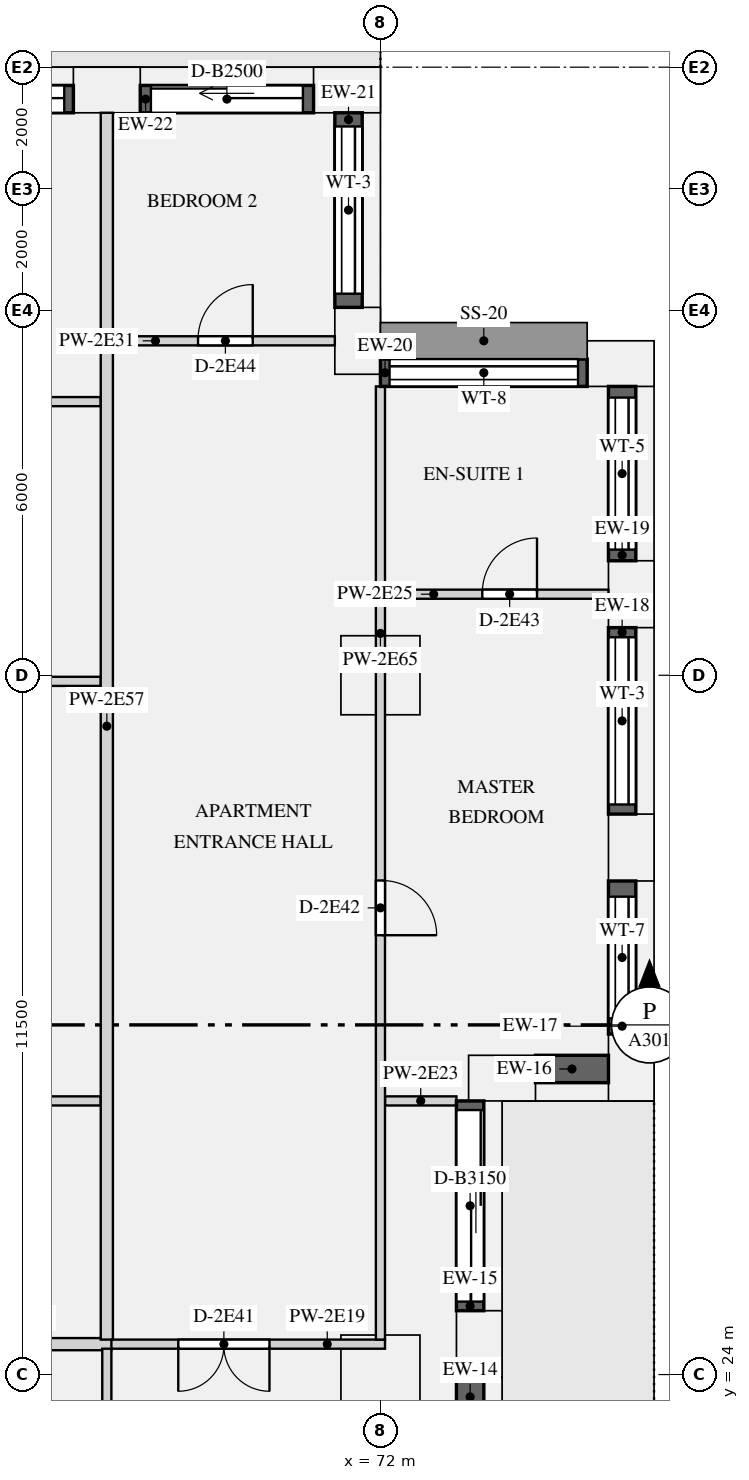
"""IFC4 building model, lengths in metres.
Left out: names, types, materials, properties, quantities, classifications, styles, units other than length and angle.
Written with IfcOpenShell. Run it as: python <this file> out.ifc"""

import sys

from ifc_helpers import new_model, si_unit, direction, frame, frame_2d, origin, origin_2d, place, context, subcontext, project, spatial, rectangle, extrude, element, fill, save


model = new_model("IFC4")
c1 = context("Model", 3, precision=1e-05, world=origin(), true_north=direction((0.0, 1.0)))
c2 = subcontext(c1, "Body", "Model", "MODEL_VIEW")
j1 = project(units=[si_unit("LENGTHUNIT", "METRE"), si_unit("PLANEANGLEUNIT", "RADIAN")], contexts=[c1])
p1 = place(None, origin())
s1 = spatial("IfcSite", under=j1, at=p1, CompositionType="ELEMENT")
p2 = place(p1, origin())
s2 = spatial("IfcBuilding", under=s1, at=p2, CompositionType="ELEMENT")
p3 = place(p2, frame((0.0, 0.0, 118.2)))
s3 = spatial("IfcBuildingStorey", under=s2, at=p3, CompositionType="ELEMENT", Elevation=118.2)
for number, where, z_axis, x_axis in (
    (1, (73.625, 24.5, 0.0), (0.0, 0.0, 1.0), (0.0, 1.0, 0.0)),
    (2, (74.0, 28.875, 0.0), (0.0, 0.0, 1.0), (1.0, 0.0, 0.0)),
    (3, (76.125, 29.05, 0.0), (0.0, 0.0, 1.0), (0.0, 1.0, 0.0)),
    (4, (76.125, 32.667, 0.0), (0.0, 0.0, 1.0), (0.0, 1.0, 0.0)),
    (5, (76.125, 36.833, 0.0), (0.0, 0.0, 1.0), (0.0, 1.0, 0.0)),
    (6, (75.95, 40.625, 0.0), (0.0, 0.0, 1.0), (-1.0, 0.0, 0.0)),
    (7, (71.625, 41.0, 0.0), (0.0, 0.0, 1.0), (0.0, 1.0, 0.0)),
    (8, (71.45, 45.125, 0.0), (0.0, 0.0, 1.0), (-1.0, 0.0, 0.0)),
    (9, (67.5, 45.125, 0.0), (0.0, 0.0, 1.0), (-1.0, 0.0, 0.0)),
):
    element("IfcColumn", number, at=place(p3, frame(where, z_axis=z_axis, x_axis=x_axis)), inside=s3, PredefinedType="USERDEFINED", context=c2, shape_type="SweptSolid", body=[
        extrude(rectangle(XDim=1.1, YDim=0.75, at=origin_2d()), origin(), (0.0, 0.0, 1.0), 3.15),
    ])
for number, where, z_axis, x_axis in (
    (10, (72.0, 24.0, 0.0), (0.0, 0.0, 1.0), (1.0, 0.0, 0.0)),
    (11, (72.0, 35.5, 0.0), (0.0, 0.0, 1.0), (1.0, 0.0, 0.0)),
):
    element("IfcColumn", number, at=place(p3, frame(where, z_axis=z_axis, x_axis=x_axis)), inside=s3, PredefinedType="COLUMN", context=c2, shape_type="SweptSolid", body=[
        extrude(rectangle(XDim=1.3, YDim=1.3, at=origin_2d()), origin(), (0.0, 0.0, 1.0), 3.15),
    ])
p4 = place(p3, frame((73.475, 21.05, 0.0), z_axis=(0.0, 0.0, 1.0), x_axis=(0.0, 1.0, 0.0)))
e12 = element("IfcWall", 12, at=p4, inside=s3, PredefinedType="SOLIDWALL", context=c2, shape_type="SweptSolid", body=[
    extrude(rectangle(XDim=2.9, YDim=0.45, at=frame_2d((1.45, 0.0))), origin(), (0.0, 0.0, 1.0), 2.83),
])
p5 = place(p4, frame((0.165, 0.0, 0.0)))
e13 = element("IfcOpeningElement", 13, at=p5, cuts=e12, PredefinedType="OPENING", context=c2, shape_type="SweptSolid", body=[
    extrude(rectangle(XDim=2.1, YDim=2.3, at=frame_2d((1.05, 1.15))), frame((0.0, 0.235, 0.0), z_axis=(0.0, -1.0, 0.0), x_axis=(1.0, 0.0, 0.0)), (0.0, 0.0, 1.0), 0.47),
])
p6 = place(p3, frame((73.475, 25.05, 0.0), z_axis=(0.0, 0.0, 1.0), x_axis=(0.0, 1.0, 0.0)))
e14 = element("IfcWall", 14, at=p6, inside=s3, PredefinedType="SOLIDWALL", context=c2, shape_type="SweptSolid", body=[
    extrude(rectangle(XDim=3.45, YDim=0.45, at=frame_2d((1.725, 0.0))), origin(), (0.0, 0.0, 1.0), 2.83),
])
p7 = place(p6, frame((0.15, 0.0, 0.0)))
e15 = element("IfcOpeningElement", 15, at=p7, cuts=e14, PredefinedType="OPENING", context=c2, shape_type="SweptSolid", body=[
    extrude(rectangle(XDim=3.15, YDim=2.3, at=frame_2d((1.575, 1.15))), frame((0.0, 0.235, 0.0), z_axis=(0.0, -1.0, 0.0), x_axis=(1.0, 0.0, 0.0)), (0.0, 0.0, 1.0), 0.47),
])
p8 = place(p3, frame((74.55, 29.025, 0.9), z_axis=(0.0, 0.0, 1.0), x_axis=(1.0, 0.0, 0.0)))
e16 = element("IfcWall", 16, at=p8, inside=s3, PredefinedType="SOLIDWALL", context=c2, shape_type="SweptSolid", body=[
    extrude(rectangle(XDim=1.2, YDim=0.45, at=frame_2d((0.6, 0.0))), origin(), (0.0, 0.0, 1.0), 1.93),
])
p9 = place(p3, frame((75.975, 29.6, 0.9), z_axis=(0.0, 0.0, 1.0), x_axis=(0.0, 1.0, 0.0)))
e17 = element("IfcWall", 17, at=p9, inside=s3, PredefinedType="SOLIDWALL", context=c2, shape_type="SweptSolid", body=[
    extrude(rectangle(XDim=2.517, YDim=0.45, at=frame_2d((1.258, 0.0))), origin(), (0.0, 0.0, 1.0), 1.93),
])
p10 = place(p9, frame((0.259, 0.0, 0.15)))
e18 = element("IfcOpeningElement", 18, at=p10, cuts=e17, PredefinedType="OPENING", context=c2, shape_type="SweptSolid", body=[
    extrude(rectangle(XDim=2.0, YDim=1.5, at=frame_2d((1.0, 0.75))), frame((0.0, 0.235, 0.0), z_axis=(0.0, -1.0, 0.0), x_axis=(1.0, 0.0, 0.0)), (0.0, 0.0, 1.0), 0.47),
])
p11 = place(p3, frame((75.975, 33.217, 0.9), z_axis=(0.0, 0.0, 1.0), x_axis=(0.0, 1.0, 0.0)))
e19 = element("IfcWall", 19, at=p11, inside=s3, PredefinedType="SOLIDWALL", context=c2, shape_type="SweptSolid", body=[
    extrude(rectangle(XDim=3.066, YDim=0.45, at=frame_2d((1.533, 0.0))), origin(), (0.0, 0.0, 1.0), 1.93),
])
p12 = place(p11, frame((0.158, 0.0, 0.15)))
e20 = element("IfcOpeningElement", 20, at=p12, cuts=e19, PredefinedType="OPENING", context=c2, shape_type="SweptSolid", body=[
    extrude(rectangle(XDim=2.75, YDim=1.5, at=frame_2d((1.375, 0.75))), frame((0.0, 0.235, 0.0), z_axis=(0.0, -1.0, 0.0), x_axis=(1.0, 0.0, 0.0)), (0.0, 0.0, 1.0), 0.47),
])
p13 = place(p3, frame((75.975, 37.383, 0.9), z_axis=(0.0, 0.0, 1.0), x_axis=(0.0, 1.0, 0.0)))
e21 = element("IfcWall", 21, at=p13, inside=s3, PredefinedType="SOLIDWALL", context=c2, shape_type="SweptSolid", body=[
    extrude(rectangle(XDim=2.867, YDim=0.45, at=frame_2d((1.434, 0.0))), origin(), (0.0, 0.0, 1.0), 1.93),
])
p14 = place(p13, frame((0.184, 0.0, 0.15)))
e22 = element("IfcOpeningElement", 22, at=p14, cuts=e21, PredefinedType="OPENING", context=c2, shape_type="SweptSolid", body=[
    extrude(rectangle(XDim=2.5, YDim=1.5, at=frame_2d((1.25, 0.75))), frame((0.0, 0.235, 0.0), z_axis=(0.0, -1.0, 0.0), x_axis=(1.0, 0.0, 0.0)), (0.0, 0.0, 1.0), 0.47),
])
p15 = place(p3, frame((75.4, 40.475, 0.9), z_axis=(0.0, 0.0, 1.0), x_axis=(-1.0, 0.0, 0.0)))
e23 = element("IfcWall", 23, at=p15, inside=s3, PredefinedType="SOLIDWALL", context=c2, shape_type="SweptSolid", body=[
    extrude(rectangle(XDim=3.4, YDim=0.45, at=frame_2d((1.7, 0.0))), origin(), (0.0, 0.0, 1.0), 1.93),
])
p16 = place(p15, frame((0.15, 0.0, 0.15)))
e24 = element("IfcOpeningElement", 24, at=p16, cuts=e23, PredefinedType="OPENING", context=c2, shape_type="SweptSolid", body=[
    extrude(rectangle(XDim=3.1, YDim=1.5, at=frame_2d((1.55, 0.75))), frame((0.0, 0.235, 0.0), z_axis=(0.0, -1.0, 0.0), x_axis=(1.0, 0.0, 0.0)), (0.0, 0.0, 1.0), 0.47),
])
p17 = place(p3, frame((71.475, 41.55, 0.9), z_axis=(0.0, 0.0, 1.0), x_axis=(0.0, 1.0, 0.0)))
e25 = element("IfcWall", 25, at=p17, inside=s3, PredefinedType="SOLIDWALL", context=c2, shape_type="SweptSolid", body=[
    extrude(rectangle(XDim=3.2, YDim=0.45, at=frame_2d((1.6, 0.0))), origin(), (0.0, 0.0, 1.0), 1.93),
])
p18 = place(p17, frame((0.225, 0.0, 0.15)))
e26 = element("IfcOpeningElement", 26, at=p18, cuts=e25, PredefinedType="OPENING", context=c2, shape_type="SweptSolid", body=[
    extrude(rectangle(XDim=2.75, YDim=1.5, at=frame_2d((1.375, 0.75))), frame((0.0, 0.235, 0.0), z_axis=(0.0, -1.0, 0.0), x_axis=(1.0, 0.0, 0.0)), (0.0, 0.0, 1.0), 0.47),
])
p19 = place(p3, frame((70.9, 44.975, 0.0), z_axis=(0.0, 0.0, 1.0), x_axis=(-1.0, 0.0, 0.0)))
e27 = element("IfcWall", 27, at=p19, inside=s3, PredefinedType="SOLIDWALL", context=c2, shape_type="SweptSolid", body=[
    extrude(rectangle(XDim=2.85, YDim=0.45, at=frame_2d((1.425, 0.0))), origin(), (0.0, 0.0, 1.0), 2.83),
])
p20 = place(p19, frame((0.175, 0.0, 0.0)))
e28 = element("IfcOpeningElement", 28, at=p20, cuts=e27, PredefinedType="OPENING", context=c2, shape_type="SweptSolid", body=[
    extrude(rectangle(XDim=2.5, YDim=2.3, at=frame_2d((1.25, 1.15))), frame((0.0, 0.235, 0.0), z_axis=(0.0, -1.0, 0.0), x_axis=(1.0, 0.0, 0.0)), (0.0, 0.0, 1.0), 0.47),
])
p21 = place(p3, frame((66.95, 44.975, 0.0), z_axis=(0.0, 0.0, 1.0), x_axis=(-1.0, 0.0, 0.0)))
e29 = element("IfcWall", 29, at=p21, inside=s3, PredefinedType="SOLIDWALL", context=c2, shape_type="SweptSolid", body=[
    extrude(rectangle(XDim=3.4, YDim=0.45, at=frame_2d((1.7, 0.0))), origin(), (0.0, 0.0, 1.0), 2.83),
])
p22 = place(p21, frame((0.15, 0.0, 0.0)))
e30 = element("IfcOpeningElement", 30, at=p22, cuts=e29, PredefinedType="OPENING", context=c2, shape_type="SweptSolid", body=[
    extrude(rectangle(XDim=3.1, YDim=2.3, at=frame_2d((1.55, 1.15))), frame((0.0, 0.235, 0.0), z_axis=(0.0, -1.0, 0.0), x_axis=(1.0, 0.0, 0.0)), (0.0, 0.0, 1.0), 0.47),
])
p23 = place(p3, frame((67.425, 24.5, 0.0), z_axis=(0.0, 0.0, 1.0), x_axis=(1.0, 0.0, 0.0)))
e31 = element("IfcWall", 31, at=p23, inside=s3, PredefinedType="PARTITIONING", context=c2, shape_type="SweptSolid", body=[
    extrude(rectangle(XDim=4.65, YDim=0.15, at=frame_2d((2.325, 0.0))), origin(), (0.0, 0.0, 1.0), 2.83),
])
p24 = place(p23, frame((1.25, 0.0, 0.0)))
e32 = element("IfcOpeningElement", 32, at=p24, cuts=e31, PredefinedType="OPENING", context=c2, shape_type="SweptSolid", body=[
    extrude(rectangle(XDim=1.5, YDim=2.1, at=frame_2d((0.75, 1.05))), frame((0.0, 0.085, 0.0), z_axis=(0.0, -1.0, 0.0), x_axis=(1.0, 0.0, 0.0)), (0.0, 0.0, 1.0), 0.17),
])
p25 = place(p3, frame((64.4, 24.5, 0.0), z_axis=(0.0, 0.0, 1.0), x_axis=(1.0, 0.0, 0.0)))
e33 = element("IfcWall", 33, at=p25, inside=s3, PredefinedType="PARTITIONING", context=c2, shape_type="SweptSolid", body=[
    extrude(rectangle(XDim=3.175, YDim=0.2, at=frame_2d((1.587, 0.0))), origin(), (0.0, 0.0, 1.0), 2.83),
])
p26 = place(p3, frame((59.8, 28.5, 0.0), z_axis=(0.0, 0.0, 1.0), x_axis=(1.0, 0.0, 0.0)))
e34 = element("IfcWall", 34, at=p26, inside=s3, PredefinedType="PARTITIONING", context=c2, shape_type="SweptSolid", body=[
    extrude(rectangle(XDim=7.6, YDim=0.15, at=frame_2d((3.8, 0.0))), origin(), (0.0, 0.0, 1.0), 2.83),
])
p27 = place(p26, frame((1.9, 0.0, 0.0)))
e35 = element("IfcOpeningElement", 35, at=p27, cuts=e34, PredefinedType="OPENING", context=c2, shape_type="SweptSolid", body=[
    extrude(rectangle(XDim=0.9, YDim=2.1, at=frame_2d((0.45, 1.05))), frame((0.0, 0.085, 0.0), z_axis=(0.0, -1.0, 0.0), x_axis=(1.0, 0.0, 0.0)), (0.0, 0.0, 1.0), 0.17),
])
p28 = place(p3, frame((72.075, 28.5, 0.0), z_axis=(0.0, 0.0, 1.0), x_axis=(1.0, 0.0, 0.0)))
e36 = element("IfcWall", 36, at=p28, inside=s3, PredefinedType="PARTITIONING", context=c2, shape_type="SweptSolid", body=[
    extrude(rectangle(XDim=1.175, YDim=0.15, at=frame_2d((0.587, 0.0))), origin(), (0.0, 0.0, 1.0), 2.83),
])
p29 = place(p3, frame((72.075, 36.833, 0.0), z_axis=(0.0, 0.0, 1.0), x_axis=(1.0, 0.0, 0.0)))
e37 = element("IfcWall", 37, at=p29, inside=s3, PredefinedType="PARTITIONING", context=c2, shape_type="SweptSolid", body=[
    extrude(rectangle(XDim=3.675, YDim=0.15, at=frame_2d((1.837, 0.0))), origin(), (0.0, 0.0, 1.0), 2.83),
])
p30 = place(p29, frame((1.6, 0.0, 0.0)))
e38 = element("IfcOpeningElement", 38, at=p30, cuts=e37, PredefinedType="OPENING", context=c2, shape_type="SweptSolid", body=[
    extrude(rectangle(XDim=0.9, YDim=2.1, at=frame_2d((0.45, 1.05))), frame((0.0, 0.085, 0.0), z_axis=(0.0, -1.0, 0.0), x_axis=(1.0, 0.0, 0.0)), (0.0, 0.0, 1.0), 0.17),
])
p31 = place(p3, frame((59.8, 35.4, 0.0), z_axis=(0.0, 0.0, 1.0), x_axis=(1.0, 0.0, 0.0)))
e39 = element("IfcWall", 39, at=p31, inside=s3, PredefinedType="PARTITIONING", context=c2, shape_type="SweptSolid", body=[
    extrude(rectangle(XDim=7.6, YDim=0.15, at=frame_2d((3.8, 0.0))), origin(), (0.0, 0.0, 1.0), 2.83),
])
p32 = place(p31, frame((5.025, 0.0, 0.0)))
e40 = element("IfcOpeningElement", 40, at=p32, cuts=e39, PredefinedType="OPENING", context=c2, shape_type="SweptSolid", body=[
    extrude(rectangle(XDim=1.5, YDim=2.1, at=frame_2d((0.75, 1.05))), frame((0.0, 0.085, 0.0), z_axis=(0.0, -1.0, 0.0), x_axis=(1.0, 0.0, 0.0)), (0.0, 0.0, 1.0), 0.17),
])
p33 = place(p3, frame((67.6, 41.0, 0.0), z_axis=(0.0, 0.0, 1.0), x_axis=(1.0, 0.0, 0.0)))
e41 = element("IfcWall", 41, at=p33, inside=s3, PredefinedType="PARTITIONING", context=c2, shape_type="SweptSolid", body=[
    extrude(rectangle(XDim=3.65, YDim=0.15, at=frame_2d((1.825, 0.0))), origin(), (0.0, 0.0, 1.0), 2.83),
])
p34 = place(p33, frame((1.4, 0.0, 0.0)))
e42 = element("IfcOpeningElement", 42, at=p34, cuts=e41, PredefinedType="OPENING", context=c2, shape_type="SweptSolid", body=[
    extrude(rectangle(XDim=0.9, YDim=2.1, at=frame_2d((0.45, 1.05))), frame((0.0, 0.085, 0.0), z_axis=(0.0, -1.0, 0.0), x_axis=(1.0, 0.0, 0.0)), (0.0, 0.0, 1.0), 0.17),
])
p35 = place(p3, frame((45.075, 40.0, 0.0), z_axis=(0.0, 0.0, 1.0), x_axis=(1.0, 0.0, 0.0)))
e43 = element("IfcWall", 43, at=p35, inside=s3, PredefinedType="PARTITIONING", context=c2, shape_type="SweptSolid", body=[
    extrude(rectangle(XDim=22.325, YDim=0.15, at=frame_2d((11.163, 0.0))), origin(), (0.0, 0.0, 1.0), 2.83),
])
p36 = place(p35, frame((0.975, 0.0, 0.0)))
e44 = element("IfcOpeningElement", 44, at=p36, cuts=e43, PredefinedType="OPENING", context=c2, shape_type="SweptSolid", body=[
    extrude(rectangle(XDim=0.9, YDim=2.1, at=frame_2d((0.45, 1.05))), frame((0.0, 0.085, 0.0), z_axis=(0.0, -1.0, 0.0), x_axis=(1.0, 0.0, 0.0)), (0.0, 0.0, 1.0), 0.17),
])
p37 = place(p35, frame((6.225, 0.0, 0.0)))
e45 = element("IfcOpeningElement", 45, at=p37, cuts=e43, PredefinedType="OPENING", context=c2, shape_type="SweptSolid", body=[
    extrude(rectangle(XDim=0.9, YDim=2.1, at=frame_2d((0.45, 1.05))), frame((0.0, 0.085, 0.0), z_axis=(0.0, -1.0, 0.0), x_axis=(1.0, 0.0, 0.0)), (0.0, 0.0, 1.0), 0.17),
])
p38 = place(p35, frame((12.975, 0.0, 0.0)))
e46 = element("IfcOpeningElement", 46, at=p38, cuts=e43, PredefinedType="OPENING", context=c2, shape_type="SweptSolid", body=[
    extrude(rectangle(XDim=0.9, YDim=2.1, at=frame_2d((0.45, 1.05))), frame((0.0, 0.085, 0.0), z_axis=(0.0, -1.0, 0.0), x_axis=(1.0, 0.0, 0.0)), (0.0, 0.0, 1.0), 0.17),
])
p39 = place(p3, frame((67.5, 16.575, 0.0), z_axis=(0.0, 0.0, 1.0), x_axis=(0.0, 1.0, 0.0)))
e47 = element("IfcWall", 47, at=p39, inside=s3, PredefinedType="PARTITIONING", context=c2, shape_type="SweptSolid", body=[
    extrude(rectangle(XDim=7.85, YDim=0.15, at=frame_2d((3.925, 0.0))), origin(), (0.0, 0.0, 1.0), 2.83),
])
p40 = place(p3, frame((67.5, 24.575, 0.0), z_axis=(0.0, 0.0, 1.0), x_axis=(0.0, 1.0, 0.0)))
e48 = element("IfcWall", 48, at=p40, inside=s3, PredefinedType="PARTITIONING", context=c2, shape_type="SweptSolid", body=[
    extrude(rectangle(XDim=20.175, YDim=0.2, at=frame_2d((10.087, 0.0))), origin(), (0.0, 0.0, 1.0), 2.83),
])
p41 = place(p3, frame((72.0, 24.575, 0.0), z_axis=(0.0, 0.0, 1.0), x_axis=(0.0, 1.0, 0.0)))
e49 = element("IfcWall", 49, at=p41, inside=s3, PredefinedType="PARTITIONING", context=c2, shape_type="SweptSolid", body=[
    extrude(rectangle(XDim=15.675, YDim=0.15, at=frame_2d((7.837, 0.0))), origin(), (0.0, 0.0, 1.0), 2.83),
])
p42 = place(p41, frame((6.65, 0.0, 0.0)))
e50 = element("IfcOpeningElement", 50, at=p42, cuts=e49, PredefinedType="OPENING", context=c2, shape_type="SweptSolid", body=[
    extrude(rectangle(XDim=0.9, YDim=2.1, at=frame_2d((0.45, 1.05))), frame((0.0, 0.085, 0.0), z_axis=(0.0, -1.0, 0.0), x_axis=(1.0, 0.0, 0.0)), (0.0, 0.0, 1.0), 0.17),
])
p43 = place(p7, origin())
e51 = element("IfcDoor", 51, at=p43, inside=s3, OperationType="SLIDING_TO_LEFT", PredefinedType="DOOR", context=c2, shape_type="SweptSolid", body=[
    extrude(rectangle(XDim=3.15, YDim=2.3, at=frame_2d((1.575, 1.15))), frame((0.0, -0.07, 0.0), z_axis=(0.0, -1.0, 0.0), x_axis=(1.0, 0.0, 0.0)), (0.0, 0.0, 1.0), 0.05),
])
fill(e15, e51)
p44 = place(p10, origin())
e52 = element("IfcWindow", 52, at=p44, inside=s3, PartitioningType="SINGLE_PANEL", PredefinedType="WINDOW", context=c2, shape_type="SweptSolid", body=[
    extrude(rectangle(XDim=2.0, YDim=1.5, at=frame_2d((1.0, 0.75))), frame((0.0, -0.065, 0.0), z_axis=(0.0, -1.0, 0.0), x_axis=(1.0, 0.0, 0.0)), (0.0, 0.0, 1.0), 0.06),
])
fill(e18, e52)
p45 = place(p12, origin())
e53 = element("IfcWindow", 53, at=p45, inside=s3, PartitioningType="SINGLE_PANEL", PredefinedType="WINDOW", context=c2, shape_type="SweptSolid", body=[
    extrude(rectangle(XDim=2.75, YDim=1.5, at=frame_2d((1.375, 0.75))), frame((0.0, -0.065, 0.0), z_axis=(0.0, -1.0, 0.0), x_axis=(1.0, 0.0, 0.0)), (0.0, 0.0, 1.0), 0.06),
])
fill(e20, e53)
p46 = place(p14, origin())
e54 = element("IfcWindow", 54, at=p46, inside=s3, PartitioningType="SINGLE_PANEL", PredefinedType="WINDOW", context=c2, shape_type="SweptSolid", body=[
    extrude(rectangle(XDim=2.5, YDim=1.5, at=frame_2d((1.25, 0.75))), frame((0.0, -0.065, 0.0), z_axis=(0.0, -1.0, 0.0), x_axis=(1.0, 0.0, 0.0)), (0.0, 0.0, 1.0), 0.06),
])
fill(e22, e54)
p47 = place(p16, origin())
e55 = element("IfcWindow", 55, at=p47, inside=s3, PartitioningType="SINGLE_PANEL", PredefinedType="WINDOW", context=c2, shape_type="SweptSolid", body=[
    extrude(rectangle(XDim=3.1, YDim=1.5, at=frame_2d((1.55, 0.75))), frame((0.0, -0.065, 0.0), z_axis=(0.0, -1.0, 0.0), x_axis=(1.0, 0.0, 0.0)), (0.0, 0.0, 1.0), 0.06),
])
fill(e24, e55)
p48 = place(p18, origin())
e56 = element("IfcWindow", 56, at=p48, inside=s3, PartitioningType="SINGLE_PANEL", PredefinedType="WINDOW", context=c2, shape_type="SweptSolid", body=[
    extrude(rectangle(XDim=2.75, YDim=1.5, at=frame_2d((1.375, 0.75))), frame((0.0, -0.065, 0.0), z_axis=(0.0, -1.0, 0.0), x_axis=(1.0, 0.0, 0.0)), (0.0, 0.0, 1.0), 0.06),
])
fill(e26, e56)
p49 = place(p20, origin())
e57 = element("IfcDoor", 57, at=p49, inside=s3, OperationType="SLIDING_TO_LEFT", PredefinedType="DOOR", context=c2, shape_type="SweptSolid", body=[
    extrude(rectangle(XDim=2.5, YDim=2.3, at=frame_2d((1.25, 1.15))), frame((0.0, -0.07, 0.0), z_axis=(0.0, -1.0, 0.0), x_axis=(1.0, 0.0, 0.0)), (0.0, 0.0, 1.0), 0.05),
])
fill(e28, e57)
p50 = place(p22, origin())
e58 = element("IfcDoor", 58, at=p50, inside=s3, OperationType="SLIDING_TO_LEFT", PredefinedType="DOOR", context=c2, shape_type="SweptSolid", body=[
    extrude(rectangle(XDim=3.1, YDim=2.3, at=frame_2d((1.55, 1.15))), frame((0.0, -0.07, 0.0), z_axis=(0.0, -1.0, 0.0), x_axis=(1.0, 0.0, 0.0)), (0.0, 0.0, 1.0), 0.05),
])
fill(e30, e58)
p51 = place(p24, frame((1.5, 0.0, 0.0), z_axis=(0.0, 0.0, 1.0), x_axis=(-1.0, 0.0, 0.0)))
e59 = element("IfcDoor", 59, at=p51, inside=s3, OperationType="DOUBLE_DOOR_SINGLE_SWING", PredefinedType="DOOR", context=c2, shape_type="SweptSolid", body=[
    extrude(rectangle(XDim=1.5, YDim=2.1, at=frame_2d((0.75, 1.05))), frame((0.0, 0.025, 0.0), z_axis=(0.0, -1.0, 0.0), x_axis=(1.0, 0.0, 0.0)), (0.0, 0.0, 1.0), 0.05),
])
fill(e32, e59)
p52 = place(p42, frame((0.9, 0.0, 0.0), z_axis=(0.0, 0.0, 1.0), x_axis=(-1.0, 0.0, 0.0)))
e60 = element("IfcDoor", 60, at=p52, inside=s3, OperationType="SINGLE_SWING_RIGHT", PredefinedType="DOOR", context=c2, shape_type="SweptSolid", body=[
    extrude(rectangle(XDim=0.9, YDim=2.1, at=frame_2d((0.45, 1.05))), frame((0.0, 0.025, 0.0), z_axis=(0.0, -1.0, 0.0), x_axis=(1.0, 0.0, 0.0)), (0.0, 0.0, 1.0), 0.05),
])
fill(e50, e60)
p53 = place(p30, origin())
e61 = element("IfcDoor", 61, at=p53, inside=s3, OperationType="SINGLE_SWING_RIGHT", PredefinedType="DOOR", context=c2, shape_type="SweptSolid", body=[
    extrude(rectangle(XDim=0.9, YDim=2.1, at=frame_2d((0.45, 1.05))), frame((0.0, 0.025, 0.0), z_axis=(0.0, -1.0, 0.0), x_axis=(1.0, 0.0, 0.0)), (0.0, 0.0, 1.0), 0.05),
])
fill(e38, e61)
p54 = place(p34, origin())
e62 = element("IfcDoor", 62, at=p54, inside=s3, OperationType="SINGLE_SWING_RIGHT", PredefinedType="DOOR", context=c2, shape_type="SweptSolid", body=[
    extrude(rectangle(XDim=0.9, YDim=2.1, at=frame_2d((0.45, 1.05))), frame((0.0, 0.025, 0.0), z_axis=(0.0, -1.0, 0.0), x_axis=(1.0, 0.0, 0.0)), (0.0, 0.0, 1.0), 0.05),
])
fill(e42, e62)
save(model, sys.argv[1])
